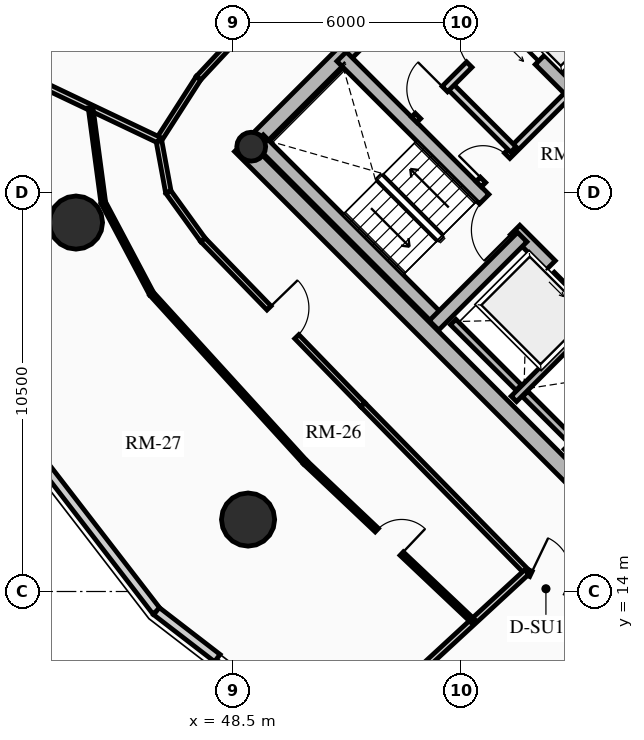
"""IFC4 building model, lengths in metres.
Left out: names, types, materials, properties, quantities, classifications, styles, units other than length and angle.
Written with IfcOpenShell. Run it as: python <this file> out.ifc"""

import sys

from ifc_helpers import new_model, si_unit, direction, frame, frame_2d, origin, origin_2d, place, context, subcontext, project, spatial, rectangle, circle, hollow_circle, extrude, source, transform, mapped, element, fill, save


model = new_model("IFC4")
c1 = context("Model", 3, precision=1e-05, world=origin(), true_north=direction((0.0, 1.0)))
c2 = subcontext(c1, "Body", "Model", "MODEL_VIEW")
j1 = project(units=[si_unit("LENGTHUNIT", "METRE"), si_unit("PLANEANGLEUNIT", "RADIAN")], contexts=[c1])
p1 = place(None, origin())
s1 = spatial("IfcSite", under=j1, at=p1, CompositionType="ELEMENT")
p2 = place(p1, origin())
s2 = spatial("IfcBuilding", under=s1, at=p2, CompositionType="ELEMENT")
p3 = place(p2, frame((0.0, 0.0, 116.71)))
s3 = spatial("IfcBuildingStorey", under=s2, at=p3, CompositionType="ELEMENT", Elevation=116.71)
for number, where, z_axis, x_axis in (
    (1, (58.737, 15.697, 0.0), (0.0, 0.0, 1.0), (-0.707, 0.707, 0.0)),
    (2, (66.303, 23.263, 0.0), (0.0, 0.0, 1.0), (-0.707, 0.707, 0.0)),
):
    element("IfcWall", number, at=place(p3, frame(where, z_axis=z_axis, x_axis=x_axis)), inside=s3, PredefinedType="SHEAR", context=c2, shape_type="SweptSolid", body=[
        extrude(rectangle(XDim=14.2, YDim=0.45, at=frame_2d((7.1, 0.0))), origin(), (0.0, 0.0, 1.0), 2.91),
    ])
p4 = place(p3, frame((48.856, 25.578, 0.0), z_axis=(0.0, 0.0, 1.0), x_axis=(0.707106781187, 0.707106781187, 0.0)))
e3 = element("IfcWall", 3, at=p4, inside=s3, PredefinedType="SHEAR", context=c2, shape_type="SweptSolid", body=[
    extrude(rectangle(XDim=10.7, YDim=0.45, at=frame_2d((5.35, 0.0))), origin(), (0.0, 0.0, 1.0), 2.91),
])
m1 = source(origin(), c2, "Body", "SweptSolid", [
    extrude(rectangle(XDim=1.5, YDim=2.02, at=frame_2d((0.75, 1.01))), frame((0.0, 0.235, 0.0), z_axis=(0.0, -1.0, 0.0), x_axis=(1.0, 0.0, 0.0)), (0.0, 0.0, 1.0), 0.47),
])
p5 = place(p4, frame((4.6, 0.0, 0.0)))
e4 = element("IfcOpeningElement", 4, at=p5, cuts=e3, PredefinedType="OPENING", context=c2, shape_type="MappedRepresentation", body=[
    mapped(m1, transform((0.0, 0.0, 0.0), x_axis=(1.0, 0.0, 0.0), y_axis=(0.0, 1.0, 0.0), z_axis=(0.0, 0.0, 1.0), scale=1.0)),
])
p6 = place(p3, frame((61.078, 18.355, 0.0), z_axis=(0.0, 0.0, 1.0), x_axis=(-0.707106781187, 0.707106781187, 0.0)))
e5 = element("IfcWall", 5, at=p6, inside=s3, PredefinedType="SHEAR", context=c2, shape_type="SweptSolid", body=[
    extrude(rectangle(XDim=13.75, YDim=0.35, at=frame_2d((6.875, 0.0))), origin(), (0.0, 0.0, 1.0), 2.91),
])
m2 = source(origin(), c2, "Body", "SweptSolid", [
    extrude(rectangle(XDim=1.1, YDim=2.015, at=frame_2d((0.55, 1.007))), frame((0.0, 0.185, 0.0), z_axis=(0.0, -1.0, 0.0), x_axis=(1.0, 0.0, 0.0)), (0.0, 0.0, 1.0), 0.37),
])
p7 = place(p6, frame((4.875, 0.0, 0.0)))
e6 = element("IfcOpeningElement", 6, at=p7, cuts=e5, PredefinedType="OPENING", context=c2, shape_type="MappedRepresentation", body=[
    mapped(m2, transform((0.0, 0.0, 0.0), x_axis=(1.0, 0.0, 0.0), y_axis=(0.0, 1.0, 0.0), z_axis=(0.0, 0.0, 1.0), scale=1.0)),
])
m3 = source(origin(), c2, "Body", "SweptSolid", [
    extrude(rectangle(XDim=1.15, YDim=2.02, at=frame_2d((0.575, 1.01))), frame((0.0, 0.185, 0.0), z_axis=(0.0, -1.0, 0.0), x_axis=(1.0, 0.0, 0.0)), (0.0, 0.0, 1.0), 0.37),
])
p8 = place(p6, frame((7.295, 0.0, 0.0)))
e7 = element("IfcOpeningElement", 7, at=p8, cuts=e5, PredefinedType="OPENING", context=c2, shape_type="MappedRepresentation", body=[
    mapped(m3, transform((0.0, 0.0, 0.0), x_axis=(1.0, 0.0, 0.0), y_axis=(0.0, 1.0, 0.0), z_axis=(0.0, 0.0, 1.0), scale=1.0)),
])
p9 = place(p3, frame((63.645, 20.922, 0.0), z_axis=(0.0, 0.0, 1.0), x_axis=(-0.707106781187, 0.707106781187, 0.0)))
e8 = element("IfcWall", 8, at=p9, inside=s3, PredefinedType="SHEAR", context=c2, shape_type="SweptSolid", body=[
    extrude(rectangle(XDim=13.75, YDim=0.35, at=frame_2d((6.875, 0.0))), origin(), (0.0, 0.0, 1.0), 2.91),
])
p10 = place(p9, frame((10.0, 0.0, 0.0)))
e9 = element("IfcOpeningElement", 9, at=p10, cuts=e8, PredefinedType="OPENING", context=c2, shape_type="MappedRepresentation", body=[
    mapped(m2, transform((0.0, 0.0, 0.0), x_axis=(1.0, 0.0, 0.0), y_axis=(0.0, 1.0, 0.0), z_axis=(0.0, 0.0, 1.0), scale=1.0)),
])
p11 = place(p9, frame((12.0, 0.0, 0.0)))
e10 = element("IfcOpeningElement", 10, at=p11, cuts=e8, PredefinedType="OPENING", context=c2, shape_type="MappedRepresentation", body=[
    mapped(m2, transform((0.0, 0.0, 0.0), x_axis=(1.0, 0.0, 0.0), y_axis=(0.0, 1.0, 0.0), z_axis=(0.0, 0.0, 1.0), scale=1.0)),
])
p12 = place(p9, frame((5.305, 0.0, 0.0)))
e11 = element("IfcOpeningElement", 11, at=p12, cuts=e8, PredefinedType="OPENING", context=c2, shape_type="MappedRepresentation", body=[
    mapped(m3, transform((0.0, 0.0, 0.0), x_axis=(1.0, 0.0, 0.0), y_axis=(0.0, 1.0, 0.0), z_axis=(0.0, 0.0, 1.0), scale=1.0)),
])
p13 = place(p3, frame((53.922, 21.141, 0.0), z_axis=(0.0, 0.0, 1.0), x_axis=(-0.707088616009, 0.707124945897, 0.0)))
e12 = element("IfcWall", 12, at=p13, inside=s3, PredefinedType="SHEAR", context=c2, shape_type="SweptSolid", body=[
    extrude(rectangle(XDim=6.72, YDim=0.35, at=frame_2d((3.36, 0.0))), origin(), (0.0, 0.0, 1.0), 2.91),
])
p14 = place(p3, frame((53.784, 21.003, 0.0), z_axis=(0.0, 0.0, 1.0), x_axis=(0.707106781187, 0.707106781187, 0.0)))
e13 = element("IfcWall", 13, at=p14, inside=s3, PredefinedType="SHEAR", context=c2, shape_type="SweptSolid", body=[
    extrude(rectangle(XDim=3.285, YDim=0.35, at=frame_2d((1.643, 0.0))), origin(), (0.0, 0.0, 1.0), 2.91),
])
p15 = place(p3, frame((48.976, 25.706, 0.0), z_axis=(0.0, 0.0, 1.0), x_axis=(0.707106781187, 0.707106781187, 0.0)))
e14 = element("IfcColumn", 14, at=p15, inside=s3, PredefinedType="COLUMN", context=c2, shape_type="SweptSolid", body=[
    extrude(hollow_circle(Radius=0.38, WallThickness=0.032, at=origin_2d()), origin(), (0.0, 0.0, 1.0), 2.91),
])
for number, where, z_axis, x_axis in (
    (15, (44.365, 23.709, 0.0), (0.0, 0.0, 1.0), (1.0, 0.0, 0.0)),
    (16, (48.893, 15.893, 0.0), (0.0, 0.0, 1.0), (1.0, 0.0, 0.0)),
):
    element("IfcColumn", number, at=place(p3, frame(where, z_axis=z_axis, x_axis=x_axis)), inside=s3, PredefinedType="USERDEFINED", context=c2, shape_type="SweptSolid", body=[
        extrude(circle(Radius=0.7, at=origin_2d()), origin(), (0.0, 0.0, 1.0), 2.91),
    ])
p16 = place(p3, frame((46.483, 13.483, 0.0), z_axis=(0.0, 0.0, 1.0), x_axis=(-0.61054437102, 0.791982052206, 0.0)))
e17 = element("IfcWall", 17, at=p16, inside=s3, PredefinedType="SOLIDWALL", context=c2, shape_type="SweptSolid", body=[
    extrude(rectangle(XDim=5.942, YDim=0.24, at=frame_2d((2.971, 0.0))), origin(), (0.0, 0.0, 1.0), 2.179),
])
p17 = place(p3, frame((51.189, 9.855, 0.0), z_axis=(0.0, 0.0, 1.0), x_axis=(-0.791982052206, 0.61054437102, 0.0)))
e18 = element("IfcWall", 18, at=p17, inside=s3, PredefinedType="SOLIDWALL", context=c2, shape_type="SweptSolid", body=[
    extrude(rectangle(XDim=5.942, YDim=0.24, at=frame_2d((2.971, 0.0))), origin(), (0.0, 0.0, 1.0), 2.179),
])
m4 = source(origin(), c2, "Body", "SweptSolid", [
    extrude(rectangle(XDim=1.9, YDim=1.35, at=frame_2d((0.95, 0.675))), frame((0.0, 0.13, 0.0), z_axis=(0.0, -1.0, 0.0), x_axis=(1.0, 0.0, 0.0)), (0.0, 0.0, 1.0), 0.26),
])
p18 = place(p17, frame((2.021, 0.0, 0.65)))
e19 = element("IfcOpeningElement", 19, at=p18, cuts=e18, PredefinedType="OPENING", context=c2, shape_type="MappedRepresentation", body=[
    mapped(m4, transform((0.0, 0.0, 0.0), x_axis=(1.0, 0.0, 0.0), y_axis=(0.0, 1.0, 0.0), z_axis=(0.0, 0.0, 1.0), scale=1.0)),
])
p19 = place(p3, frame((55.888, 19.069, 0.0), z_axis=(0.0, 0.0, 1.0), x_axis=(0.707106781187, 0.707106781187, 0.0)))
e20 = element("IfcWall", 20, at=p19, inside=s3, PredefinedType="SHEAR", context=c2, shape_type="SweptSolid", body=[
    extrude(rectangle(XDim=2.97, YDim=0.2, at=frame_2d((1.485, 0.0))), origin(), (0.0, 0.0, 1.0), 2.91),
])
p20 = place(p3, frame((56.015, 19.366, 0.0), z_axis=(0.0, 0.0, 1.0), x_axis=(-0.707106781187, 0.707106781187, 0.0)))
e21 = element("IfcWall", 21, at=p20, inside=s3, PredefinedType="SHEAR", context=c2, shape_type="SweptSolid", body=[
    extrude(rectangle(XDim=2.44, YDim=0.2, at=frame_2d((1.22, 0.0))), origin(), (0.0, 0.0, 1.0), 2.91),
])
p21 = place(p3, frame((57.284, 17.673, 0.0), z_axis=(0.0, 0.0, 1.0), x_axis=(0.707147878904, 0.70706568108, 0.0)))
e22 = element("IfcWall", 22, at=p21, inside=s3, PredefinedType="SHEAR", context=c2, shape_type="SweptSolid", body=[
    extrude(rectangle(XDim=2.97, YDim=0.2, at=frame_2d((1.485, 0.0))), origin(), (0.0, 0.0, 1.0), 2.91),
])
p22 = place(p3, frame((57.412, 17.97, 0.0), z_axis=(0.0, 0.0, 1.0), x_axis=(-0.707106781187, 0.707106781187, 0.0)))
e23 = element("IfcWall", 23, at=p22, inside=s3, PredefinedType="SHEAR", context=c2, shape_type="SweptSolid", body=[
    extrude(rectangle(XDim=1.735, YDim=0.2, at=frame_2d((0.867, 0.0))), origin(), (0.0, 0.0, 1.0), 2.91),
])
p23 = place(p3, frame((57.062, 27.781, 0.0), z_axis=(0.0, 0.0, 1.0), x_axis=(0.707106781187, 0.707106781187, 0.0)))
e24 = element("IfcWall", 24, at=p23, inside=s3, PredefinedType="SHEAR", context=c2, shape_type="SweptSolid", body=[
    extrude(rectangle(XDim=2.97, YDim=0.2, at=frame_2d((1.485, 0.0))), origin(), (0.0, 0.0, 1.0), 2.91),
])
p24 = place(p3, frame((54.961, 24.719, 0.0), z_axis=(0.0, 0.0, 1.0), x_axis=(0.707106781187, 0.707106781187, 0.0)))
e25 = element("IfcWall", 25, at=p24, inside=s3, PredefinedType="PARTITIONING", context=c2, shape_type="SweptSolid", body=[
    extrude(rectangle(XDim=3.28, YDim=0.2, at=frame_2d((1.64, 0.0))), origin(), (0.0, 0.0, 1.0), 2.655),
])
m5 = source(origin(), c2, "Body", "SweptSolid", [
    extrude(rectangle(XDim=0.9, YDim=2.005, at=frame_2d((0.45, 1.002))), frame((0.0, 0.11, 0.0), z_axis=(0.0, -1.0, 0.0), x_axis=(1.0, 0.0, 0.0)), (0.0, 0.0, 1.0), 0.22),
])
p25 = place(p24, frame((0.16, 0.0, 0.0)))
e26 = element("IfcOpeningElement", 26, at=p25, cuts=e25, PredefinedType="OPENING", context=c2, shape_type="MappedRepresentation", body=[
    mapped(m5, transform((0.0, 0.0, 0.0), x_axis=(1.0, 0.0, 0.0), y_axis=(0.0, 1.0, 0.0), z_axis=(0.0, 0.0, 1.0), scale=1.0)),
])
p26 = place(p3, frame((55.874, 25.631, 0.0), z_axis=(0.0, 0.0, 1.0), x_axis=(-0.707157639372, 0.707055919343, 0.0)))
e27 = element("IfcWall", 27, at=p26, inside=s3, PredefinedType="PARTITIONING", context=c2, shape_type="SweptSolid", body=[
    extrude(rectangle(XDim=2.4, YDim=0.2, at=frame_2d((1.2, 0.0))), origin(), (0.0, 0.0, 1.0), 2.655),
])
p27 = place(p3, frame((53.264, 26.416, 0.0), z_axis=(0.0, 0.0, 1.0), x_axis=(0.707106781187, 0.707106781187, 0.0)))
e28 = element("IfcWall", 28, at=p27, inside=s3, PredefinedType="PARTITIONING", context=c2, shape_type="SweptSolid", body=[
    extrude(rectangle(XDim=3.28, YDim=0.2, at=frame_2d((1.64, 0.0))), origin(), (0.0, 0.0, 1.0), 2.655),
])
m6 = source(origin(), c2, "Body", "SweptSolid", [
    extrude(rectangle(XDim=1.0, YDim=2.015, at=frame_2d((0.5, 1.007))), frame((0.0, 0.11, 0.0), z_axis=(0.0, -1.0, 0.0), x_axis=(1.0, 0.0, 0.0)), (0.0, 0.0, 1.0), 0.22),
])
p28 = place(p27, frame((0.14, 0.0, 0.0)))
e29 = element("IfcOpeningElement", 29, at=p28, cuts=e28, PredefinedType="OPENING", context=c2, shape_type="MappedRepresentation", body=[
    mapped(m6, transform((0.0, 0.0, 0.0), x_axis=(1.0, 0.0, 0.0), y_axis=(0.0, 1.0, 0.0), z_axis=(0.0, 0.0, 1.0), scale=1.0)),
])
p29 = place(p27, frame((2.05, 0.0, 0.0)))
e30 = element("IfcOpeningElement", 30, at=p29, cuts=e28, PredefinedType="OPENING", context=c2, shape_type="MappedRepresentation", body=[
    mapped(m5, transform((0.0, 0.0, 0.0), x_axis=(1.0, 0.0, 0.0), y_axis=(0.0, 1.0, 0.0), z_axis=(0.0, 0.0, 1.0), scale=1.0)),
])
p30 = place(p3, frame((52.043, 32.28, 0.0), z_axis=(0.0, 0.0, 1.0), x_axis=(-0.682606081633, -0.730786519661, 0.0)))
e31 = element("IfcWall", 31, at=p30, inside=s3, PredefinedType="PARTITIONING", context=c2, shape_type="SweptSolid", body=[
    extrude(rectangle(XDim=6.527, YDim=0.15, at=frame_2d((3.263, 0.0))), origin(), (0.0, 0.0, 1.0), 2.225),
])
p31 = place(p3, frame((47.588, 27.51, 0.0), z_axis=(0.0, 0.0, 1.0), x_axis=(-0.540202619347, -0.841534984449, 0.0)))
e32 = element("IfcWall", 32, at=p31, inside=s3, PredefinedType="PARTITIONING", context=c2, shape_type="SweptSolid", body=[
    extrude(rectangle(XDim=1.935, YDim=0.15, at=frame_2d((0.967, 0.0))), origin(), (0.0, 0.0, 1.0), 2.225),
])
p32 = place(p3, frame((46.543, 25.882, 0.0), z_axis=(0.0, 0.0, 1.0), x_axis=(0.181153502579, -0.983454832976, 0.0)))
e33 = element("IfcWall", 33, at=p32, inside=s3, PredefinedType="PARTITIONING", context=c2, shape_type="SweptSolid", body=[
    extrude(rectangle(XDim=1.392, YDim=0.15, at=frame_2d((0.696, 0.0))), origin(), (0.0, 0.0, 1.0), 2.225),
])
p33 = place(p3, frame((46.795, 24.513, 0.0), z_axis=(0.0, 0.0, 1.0), x_axis=(0.585628197524, -0.810579801294, 0.0)))
e34 = element("IfcWall", 34, at=p33, inside=s3, PredefinedType="PARTITIONING", context=c2, shape_type="SweptSolid", body=[
    extrude(rectangle(XDim=1.554, YDim=0.15, at=frame_2d((0.777, 0.0))), origin(), (0.0, 0.0, 1.0), 2.225),
])
p34 = place(p3, frame((47.706, 23.253, 0.0), z_axis=(0.0, 0.0, 1.0), x_axis=(0.696179266346, -0.717867974707, 0.0)))
e35 = element("IfcWall", 35, at=p34, inside=s3, PredefinedType="PARTITIONING", context=c2, shape_type="SweptSolid", body=[
    extrude(rectangle(XDim=6.045, YDim=0.15, at=frame_2d((3.022, 0.0))), origin(), (0.0, 0.0, 1.0), 2.655),
])
m7 = source(origin(), c2, "Body", "SweptSolid", [
    extrude(rectangle(XDim=1.05, YDim=2.015, at=frame_2d((0.525, 1.007))), frame((0.0, 0.085, 0.0), z_axis=(0.0, -1.0, 0.0), x_axis=(1.0, 0.0, 0.0)), (0.0, 0.0, 1.0), 0.17),
])
p35 = place(p34, frame((2.497, 0.0, 0.0)))
e36 = element("IfcOpeningElement", 36, at=p35, cuts=e35, PredefinedType="OPENING", context=c2, shape_type="MappedRepresentation", body=[
    mapped(m7, transform((0.0, 0.0, 0.0), x_axis=(1.0, 0.0, 0.0), y_axis=(0.0, 1.0, 0.0), z_axis=(0.0, 0.0, 1.0), scale=1.0)),
])
p36 = place(p3, frame((51.914, 18.914, 0.0), z_axis=(0.0, 0.0, 1.0), x_axis=(0.699999313799, -0.714143515465, 0.0)))
e37 = element("IfcWall", 37, at=p36, inside=s3, PredefinedType="PARTITIONING", context=c2, shape_type="SweptSolid", body=[
    extrude(rectangle(XDim=6.162, YDim=0.15, at=frame_2d((3.081, 0.0))), origin(), (0.0, 0.0, 1.0), 2.225),
])
p37 = place(p3, frame((56.227, 14.513, 0.0), z_axis=(0.0, 0.0, 1.0), x_axis=(0.901477579283, -0.432825801044, 0.0)))
e38 = element("IfcWall", 38, at=p37, inside=s3, PredefinedType="PARTITIONING", context=c2, shape_type="SweptSolid", body=[
    extrude(rectangle(XDim=1.424, YDim=0.15, at=frame_2d((0.712, 0.0))), origin(), (0.0, 0.0, 1.0), 2.225),
])
p38 = place(p37, frame((0.12, 0.0, 0.0)))
e39 = element("IfcOpeningElement", 39, at=p38, cuts=e38, PredefinedType="OPENING", context=c2, shape_type="MappedRepresentation", body=[
    mapped(m7, transform((0.0, 0.0, 0.0), x_axis=(1.0, 0.0, 0.0), y_axis=(0.0, 1.0, 0.0), z_axis=(0.0, 0.0, 1.0), scale=1.0)),
])
p39 = place(p3, frame((46.543, 25.882, 0.0), z_axis=(0.0, 0.0, 1.0), x_axis=(-0.903054383171, 0.429526228576, 0.0)))
e40 = element("IfcWall", 40, at=p39, inside=s3, PredefinedType="PARTITIONING", context=c2, shape_type="SweptSolid", body=[
    extrude(rectangle(XDim=7.096, YDim=0.16, at=frame_2d((3.548, 0.0))), origin(), (0.0, 0.0, 1.0), 2.179),
])
p40 = place(p3, frame((56.227, 14.513, 0.0), z_axis=(0.0, 0.0, 1.0), x_axis=(-0.734951144322, -0.678120059768, 0.0)))
e41 = element("IfcWall", 41, at=p40, inside=s3, PredefinedType="PARTITIONING", context=c2, shape_type="SweptSolid", body=[
    extrude(rectangle(XDim=6.843, YDim=0.16, at=frame_2d((3.422, 0.0))), origin(), (0.0, 0.0, 1.0), 2.179),
])
p41 = place(p3, frame((44.749, 26.736, 0.0), z_axis=(0.0, 0.0, 1.0), x_axis=(0.132518524874, -0.991180528746, 0.0)))
e42 = element("IfcWall", 42, at=p41, inside=s3, PredefinedType="PARTITIONING", context=c2, shape_type="SweptSolid", body=[
    extrude(rectangle(XDim=2.524, YDim=0.125, at=frame_2d((1.262, 0.0))), origin(), (0.0, 0.0, 1.0), 2.179),
])
p42 = place(p3, frame((45.083, 24.234, 0.0), z_axis=(0.0, 0.0, 1.0), x_axis=(0.468015958378, -0.883720013751, 0.0)))
e43 = element("IfcWall", 43, at=p42, inside=s3, PredefinedType="PARTITIONING", context=c2, shape_type="SweptSolid", body=[
    extrude(rectangle(XDim=2.711, YDim=0.125, at=frame_2d((1.356, 0.0))), origin(), (0.0, 0.0, 1.0), 2.225),
])
p43 = place(p3, frame((46.352, 21.838, 0.0), z_axis=(0.0, 0.0, 1.0), x_axis=(0.673416949194, -0.739262884594, 0.0)))
e44 = element("IfcWall", 44, at=p43, inside=s3, PredefinedType="PARTITIONING", context=c2, shape_type="SweptSolid", body=[
    extrude(rectangle(XDim=6.007, YDim=0.125, at=frame_2d((3.003, 0.0))), origin(), (0.0, 0.0, 1.0), 2.655),
])
p44 = place(p3, frame((50.397, 17.397, 0.0), z_axis=(0.0, 0.0, 1.0), x_axis=(0.726427828833, -0.687242758781, 0.0)))
e45 = element("IfcWall", 45, at=p44, inside=s3, PredefinedType="PARTITIONING", context=c2, shape_type="SweptSolid", body=[
    extrude(rectangle(XDim=6.087, YDim=0.125, at=frame_2d((3.043, 0.0))), origin(), (0.0, 0.0, 1.0), 2.225),
])
m8 = source(origin(), c2, "Body", "SweptSolid", [
    extrude(rectangle(XDim=0.9, YDim=2.005, at=frame_2d((0.45, 1.002))), frame((0.0, 0.073, 0.0), z_axis=(0.0, -1.0, 0.0), x_axis=(1.0, 0.0, 0.0)), (0.0, 0.0, 1.0), 0.145),
])
p45 = place(p44, frame((2.594, 0.0, 0.0)))
e46 = element("IfcOpeningElement", 46, at=p45, cuts=e45, PredefinedType="OPENING", context=c2, shape_type="MappedRepresentation", body=[
    mapped(m8, transform((0.0, 0.0, 0.0), x_axis=(1.0, 0.0, 0.0), y_axis=(0.0, 1.0, 0.0), z_axis=(0.0, 0.0, 1.0), scale=1.0)),
])
m9 = source(origin(), c2, "Body", "SweptSolid", [
    extrude(rectangle(XDim=1.9, YDim=1.35, at=frame_2d((0.95, 0.675))), frame((0.0, 0.03, 0.0), z_axis=(0.0, -1.0, 0.0), x_axis=(1.0, 0.0, 0.0)), (0.0, 0.0, 1.0), 0.06),
])
p46 = place(p18, origin())
e47 = element("IfcWindow", 47, at=p46, inside=s3, PartitioningType="DOUBLE_PANEL_VERTICAL", PredefinedType="WINDOW", context=c2, shape_type="MappedRepresentation", body=[
    mapped(m9, transform((0.0, 0.0, 0.0), x_axis=(1.0, 0.0, 0.0), y_axis=(0.0, 1.0, 0.0), z_axis=(0.0, 0.0, 1.0), scale=1.0)),
])
fill(e19, e47)
m10 = source(origin(), c2, "Body", "SweptSolid", [
    extrude(rectangle(XDim=1.1, YDim=2.015, at=frame_2d((0.55, 1.007))), frame((0.0, 0.025, 0.0), z_axis=(0.0, -1.0, 0.0), x_axis=(1.0, 0.0, 0.0)), (0.0, 0.0, 1.0), 0.05),
])
p47 = place(p7, origin())
e48 = element("IfcDoor", 48, at=p47, inside=s3, OperationType="SLIDING_TO_LEFT", PredefinedType="DOOR", context=c2, shape_type="MappedRepresentation", body=[
    mapped(m10, transform((0.0, 0.0, 0.0), x_axis=(1.0, 0.0, 0.0), y_axis=(0.0, 1.0, 0.0), z_axis=(0.0, 0.0, 1.0), scale=1.0)),
])
fill(e6, e48)
p48 = place(p10, origin())
e49 = element("IfcDoor", 49, at=p48, inside=s3, OperationType="SLIDING_TO_LEFT", PredefinedType="DOOR", context=c2, shape_type="MappedRepresentation", body=[
    mapped(m10, transform((0.0, 0.0, 0.0), x_axis=(1.0, 0.0, 0.0), y_axis=(0.0, 1.0, 0.0), z_axis=(0.0, 0.0, 1.0), scale=1.0)),
])
fill(e9, e49)
m11 = source(origin(), c2, "Body", "SweptSolid", [
    extrude(rectangle(XDim=1.15, YDim=2.02, at=frame_2d((0.575, 1.01))), frame((0.0, 0.025, 0.0), z_axis=(0.0, -1.0, 0.0), x_axis=(1.0, 0.0, 0.0)), (0.0, 0.0, 1.0), 0.05),
])
p49 = place(p8, origin())
e50 = element("IfcDoor", 50, at=p49, inside=s3, OperationType="SINGLE_SWING_LEFT", PredefinedType="DOOR", context=c2, shape_type="MappedRepresentation", body=[
    mapped(m11, transform((0.0, 0.0, 0.0), x_axis=(1.0, 0.0, 0.0), y_axis=(0.0, 1.0, 0.0), z_axis=(0.0, 0.0, 1.0), scale=1.0)),
])
fill(e7, e50)
m12 = source(origin(), c2, "Body", "SweptSolid", [
    extrude(rectangle(XDim=0.9, YDim=2.005, at=frame_2d((0.45, 1.002))), frame((0.0, 0.025, 0.0), z_axis=(0.0, -1.0, 0.0), x_axis=(1.0, 0.0, 0.0)), (0.0, 0.0, 1.0), 0.05),
])
p50 = place(p25, origin())
e51 = element("IfcDoor", 51, at=p50, inside=s3, OperationType="SINGLE_SWING_LEFT", PredefinedType="DOOR", context=c2, shape_type="MappedRepresentation", body=[
    mapped(m12, transform((0.0, 0.0, 0.0), x_axis=(1.0, 0.0, 0.0), y_axis=(0.0, 1.0, 0.0), z_axis=(0.0, 0.0, 1.0), scale=1.0)),
])
fill(e26, e51)
m13 = source(origin(), c2, "Body", "SweptSolid", [
    extrude(rectangle(XDim=1.0, YDim=2.015, at=frame_2d((0.5, 1.007))), frame((0.0, 0.025, 0.0), z_axis=(0.0, -1.0, 0.0), x_axis=(1.0, 0.0, 0.0)), (0.0, 0.0, 1.0), 0.05),
])
p51 = place(p28, origin())
e52 = element("IfcDoor", 52, at=p51, inside=s3, OperationType="SINGLE_SWING_RIGHT", PredefinedType="DOOR", context=c2, shape_type="MappedRepresentation", body=[
    mapped(m13, transform((0.0, 0.0, 0.0), x_axis=(1.0, 0.0, 0.0), y_axis=(0.0, 1.0, 0.0), z_axis=(0.0, 0.0, 1.0), scale=1.0)),
])
fill(e29, e52)
p52 = place(p29, origin())
e53 = element("IfcDoor", 53, at=p52, inside=s3, OperationType="SINGLE_SWING_RIGHT", PredefinedType="DOOR", context=c2, shape_type="MappedRepresentation", body=[
    mapped(m12, transform((0.0, 0.0, 0.0), x_axis=(1.0, 0.0, 0.0), y_axis=(0.0, 1.0, 0.0), z_axis=(0.0, 0.0, 1.0), scale=1.0)),
])
fill(e30, e53)
m14 = source(origin(), c2, "Body", "SweptSolid", [
    extrude(rectangle(XDim=1.05, YDim=2.015, at=frame_2d((0.525, 1.007))), frame((0.0, 0.025, 0.0), z_axis=(0.0, -1.0, 0.0), x_axis=(1.0, 0.0, 0.0)), (0.0, 0.0, 1.0), 0.05),
])
p53 = place(p35, origin())
e54 = element("IfcDoor", 54, at=p53, inside=s3, OperationType="SINGLE_SWING_LEFT", PredefinedType="DOOR", context=c2, shape_type="MappedRepresentation", body=[
    mapped(m14, transform((0.0, 0.0, 0.0), x_axis=(1.0, 0.0, 0.0), y_axis=(0.0, 1.0, 0.0), z_axis=(0.0, 0.0, 1.0), scale=1.0)),
])
fill(e36, e54)
p54 = place(p45, origin())
e55 = element("IfcDoor", 55, at=p54, inside=s3, OperationType="SINGLE_SWING_RIGHT", PredefinedType="DOOR", context=c2, shape_type="MappedRepresentation", body=[
    mapped(m12, transform((0.0, 0.0, 0.0), x_axis=(1.0, 0.0, 0.0), y_axis=(0.0, 1.0, 0.0), z_axis=(0.0, 0.0, 1.0), scale=1.0)),
])
fill(e46, e55)
p55 = place(p38, origin())
e56 = element("IfcDoor", 56, at=p55, inside=s3, OperationType="SINGLE_SWING_LEFT", PredefinedType="DOOR", context=c2, shape_type="MappedRepresentation", body=[
    mapped(m14, transform((0.0, 0.0, 0.0), x_axis=(1.0, 0.0, 0.0), y_axis=(0.0, 1.0, 0.0), z_axis=(0.0, 0.0, 1.0), scale=1.0)),
])
fill(e39, e56)
save(model, sys.argv[1])
